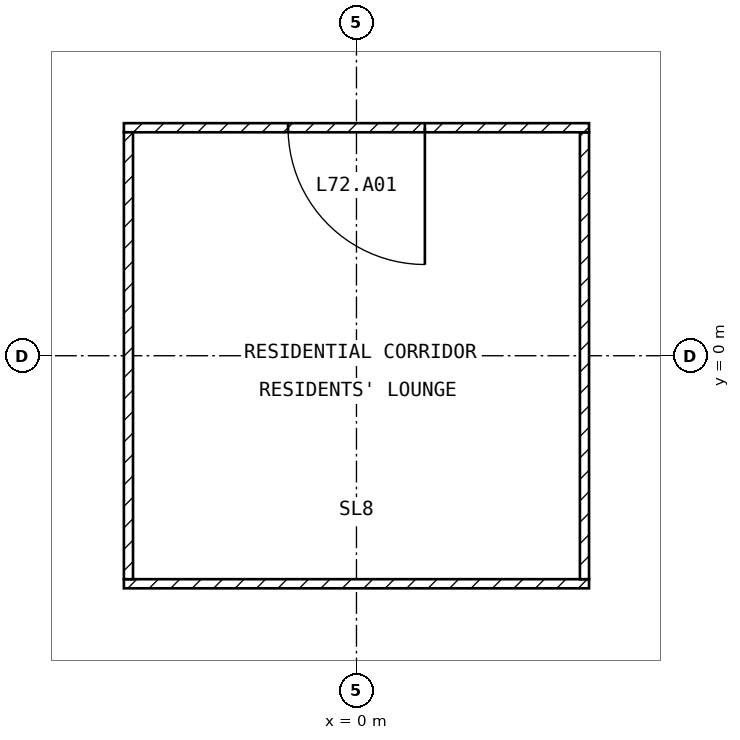
"""IFC4 building model, lengths in metres.
Left out: names, types, materials, properties, quantities, classifications, styles, units other than length and angle.
Written with IfcOpenShell. Run it as: python <this file> out.ifc"""

import sys

from ifc_helpers import new_model, si_unit, direction, frame, frame_2d, origin, place, context, subcontext, project, spatial, rectangle, extrude, element, fill, save


model = new_model("IFC4")
c1 = context("Model", 3, precision=1e-05, world=origin(), true_north=direction((0.0, 1.0)))
c2 = subcontext(c1, "Body", "Model", "MODEL_VIEW")
j1 = project(units=[si_unit("LENGTHUNIT", "METRE"), si_unit("PLANEANGLEUNIT", "RADIAN")], contexts=[c1])
p1 = place(None, origin())
s1 = spatial("IfcSite", under=j1, at=p1, CompositionType="ELEMENT")
p2 = place(p1, origin())
s2 = spatial("IfcBuilding", under=s1, at=p2, CompositionType="ELEMENT")
p3 = place(p2, frame((0.0, 0.0, 281.5)))
s3 = spatial("IfcBuildingStorey", under=s2, at=p3, CompositionType="ELEMENT", Elevation=281.5)
p4 = place(p3, frame((-3.06, -3.0, 0.0), z_axis=(0.0, 0.0, 1.0), x_axis=(1.0, 0.0, 0.0)))
e1 = element("IfcWall", 1, at=p4, inside=s3, PredefinedType="PARTITIONING", context=c2, shape_type="SweptSolid", body=[
    extrude(rectangle(XDim=6.12, YDim=0.12, at=frame_2d((3.06, 0.0))), origin(), (0.0, 0.0, 1.0), 3.2),
])
p5 = place(p3, frame((3.0, -2.94, 0.0), z_axis=(0.0, 0.0, 1.0), x_axis=(0.0, 1.0, 0.0)))
e2 = element("IfcWall", 2, at=p5, inside=s3, PredefinedType="PARTITIONING", context=c2, shape_type="SweptSolid", body=[
    extrude(rectangle(XDim=5.88, YDim=0.12, at=frame_2d((2.94, 0.0))), origin(), (0.0, 0.0, 1.0), 3.2),
])
p6 = place(p3, frame((3.06, 3.0, 0.0), z_axis=(0.0, 0.0, 1.0), x_axis=(-1.0, 0.0, 0.0)))
e3 = element("IfcWall", 3, at=p6, inside=s3, PredefinedType="PARTITIONING", context=c2, shape_type="SweptSolid", body=[
    extrude(rectangle(XDim=6.12, YDim=0.12, at=frame_2d((3.06, 0.0))), origin(), (0.0, 0.0, 1.0), 3.2),
])
p7 = place(p6, frame((2.16, 0.0, 0.0)))
e4 = element("IfcOpeningElement", 4, at=p7, cuts=e3, PredefinedType="OPENING", context=c2, shape_type="SweptSolid", body=[
    extrude(rectangle(XDim=1.8, YDim=2.1, at=frame_2d((0.9, 1.05))), frame((0.0, 0.07, 0.0), z_axis=(0.0, -1.0, 0.0), x_axis=(1.0, 0.0, 0.0)), (0.0, 0.0, 1.0), 0.14),
])
p8 = place(p3, frame((-3.0, 2.94, 0.0), z_axis=(0.0, 0.0, 1.0), x_axis=(0.0, -1.0, 0.0)))
e5 = element("IfcWall", 5, at=p8, inside=s3, PredefinedType="PARTITIONING", context=c2, shape_type="SweptSolid", body=[
    extrude(rectangle(XDim=5.88, YDim=0.12, at=frame_2d((2.94, 0.0))), origin(), (0.0, 0.0, 1.0), 3.2),
])
p9 = place(p7, origin())
e6 = element("IfcDoor", 6, at=p9, inside=s3, OperationType="SINGLE_SWING_LEFT", PredefinedType="DOOR", context=c2, shape_type="SweptSolid", body=[
    extrude(rectangle(XDim=1.8, YDim=2.1, at=frame_2d((0.9, 1.05))), frame((0.0, 0.025, 0.0), z_axis=(0.0, -1.0, 0.0), x_axis=(1.0, 0.0, 0.0)), (0.0, 0.0, 1.0), 0.05),
])
fill(e4, e6)
save(model, sys.argv[1])
